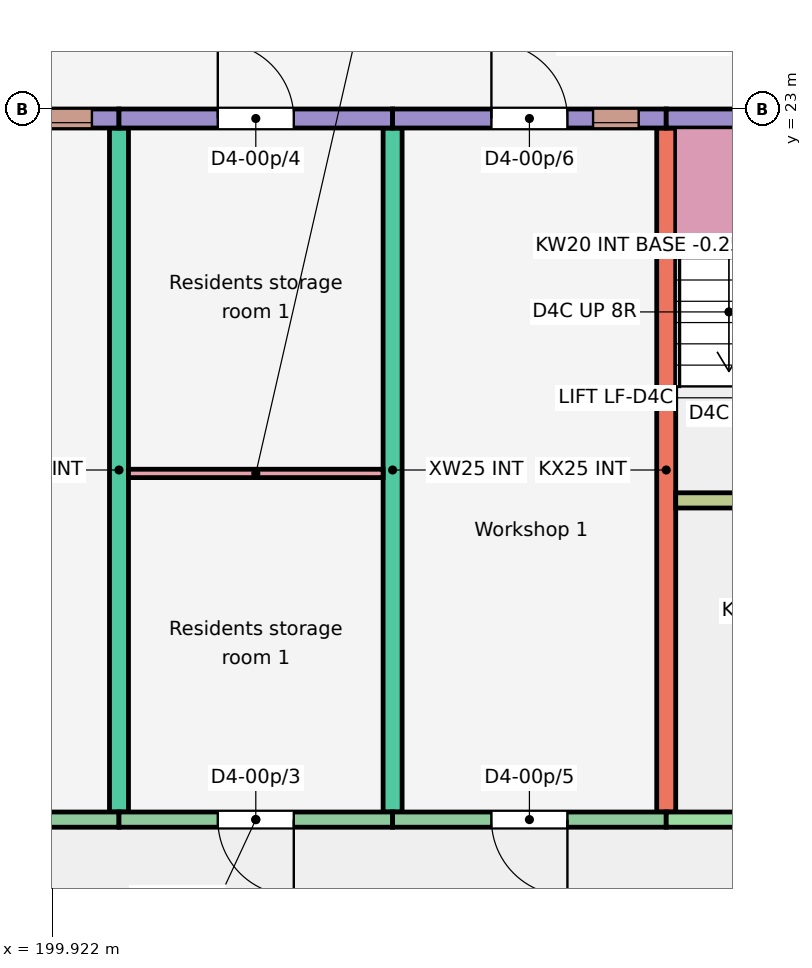
"""IFC4 building model, lengths in metres.
Left out: names, types, materials, properties, quantities, classifications, styles, units other than length and angle.
Written with IfcOpenShell. Run it as: python <this file> out.ifc"""

import sys

from ifc_helpers import new_model, si_unit, direction, frame, frame_2d, origin, place, context, subcontext, project, spatial, rectangle, extrude, element, fill, save


model = new_model("IFC4")
c1 = context("Model", 3, precision=1e-05, world=origin(), true_north=direction((0.0, 1.0)))
c2 = subcontext(c1, "Body", "Model", "MODEL_VIEW")
j1 = project(units=[si_unit("LENGTHUNIT", "METRE"), si_unit("PLANEANGLEUNIT", "RADIAN")], contexts=[c1])
p1 = place(None, origin())
s1 = spatial("IfcSite", under=j1, at=p1, CompositionType="ELEMENT")
p2 = place(p1, origin())
s2 = spatial("IfcBuilding", under=s1, at=p2, CompositionType="ELEMENT")
p3 = place(p2, origin())
s3 = spatial("IfcBuildingStorey", under=s2, at=p3, CompositionType="ELEMENT", Elevation=0.0)
for number, where, z_axis, x_axis in (
    (1, (200.8, 13.75, -0.25), (0.0, 0.0, 1.0), (0.0, 1.0, 0.0)),
    (2, (204.4, 13.75, -0.25), (0.0, 0.0, 1.0), (0.0, 1.0, 0.0)),
    (3, (208.0, 13.75, -0.25), (0.0, 0.0, 1.0), (0.0, 1.0, 0.0)),
):
    element("IfcWall", number, at=place(p3, frame(where, z_axis=z_axis, x_axis=x_axis)), inside=s3, PredefinedType="SHEAR", context=c2, shape_type="SweptSolid", body=[
        extrude(rectangle(XDim=9.0, YDim=0.25, at=frame_2d((4.5, 0.0))), origin(), (0.0, 0.0, 1.0), 3.25),
    ])
p4 = place(p3, frame((197.2, 22.875, -0.25), z_axis=(0.0, 0.0, 1.0), x_axis=(1.0, 0.0, 0.0)))
e4 = element("IfcWall", 4, at=p4, inside=s3, PredefinedType="SOLIDWALL", context=c2, shape_type="SweptSolid", body=[
    extrude(rectangle(XDim=3.6, YDim=0.25, at=frame_2d((1.8, 0.0))), origin(), (0.0, 0.0, 1.0), 3.25),
])
p5 = place(p4, frame((2.644, 0.0, 2.05)))
e5 = element("IfcOpeningElement", 5, at=p5, cuts=e4, PredefinedType="OPENING", context=c2, shape_type="SweptSolid", body=[
    extrude(rectangle(XDim=0.6, YDim=0.6, at=frame_2d((0.3, 0.3))), frame((0.0, 0.135, 0.0), z_axis=(0.0, -1.0, 0.0), x_axis=(1.0, 0.0, 0.0)), (0.0, 0.0, 1.0), 0.27),
])
p6 = place(p4, frame((1.312, 0.0, 0.25)))
e6 = element("IfcOpeningElement", 6, at=p6, cuts=e4, PredefinedType="OPENING", context=c2, shape_type="SweptSolid", body=[
    extrude(rectangle(XDim=1.0, YDim=2.1, at=frame_2d((0.5, 1.05))), frame((0.0, 0.135, 0.0), z_axis=(0.0, -1.0, 0.0), x_axis=(1.0, 0.0, 0.0)), (0.0, 0.0, 1.0), 0.27),
])
p7 = place(p3, frame((197.35, 13.65, -0.25), z_axis=(0.0, 0.0, 1.0), x_axis=(1.0, 0.0, 0.0)))
e7 = element("IfcWall", 7, at=p7, inside=s3, PredefinedType="SOLIDWALL", context=c2, shape_type="SweptSolid", body=[
    extrude(rectangle(XDim=3.45, YDim=0.2, at=frame_2d((1.725, 0.0))), origin(), (0.0, 0.0, 1.0), 3.25),
])
p8 = place(p7, frame((1.163, 0.0, 0.25)))
e8 = element("IfcOpeningElement", 8, at=p8, cuts=e7, PredefinedType="OPENING", context=c2, shape_type="SweptSolid", body=[
    extrude(rectangle(XDim=1.0, YDim=2.1, at=frame_2d((0.5, 1.05))), frame((0.0, 0.11, 0.0), z_axis=(0.0, -1.0, 0.0), x_axis=(1.0, 0.0, 0.0)), (0.0, 0.0, 1.0), 0.22),
])
p9 = place(p3, frame((200.8, 22.875, -0.25), z_axis=(0.0, 0.0, 1.0), x_axis=(1.0, 0.0, 0.0)))
e9 = element("IfcWall", 9, at=p9, inside=s3, PredefinedType="SOLIDWALL", context=c2, shape_type="SweptSolid", body=[
    extrude(rectangle(XDim=3.6, YDim=0.25, at=frame_2d((1.8, 0.0))), origin(), (0.0, 0.0, 1.0), 3.25),
])
p10 = place(p9, frame((1.3, 0.0, 0.25)))
e10 = element("IfcOpeningElement", 10, at=p10, cuts=e9, PredefinedType="OPENING", context=c2, shape_type="SweptSolid", body=[
    extrude(rectangle(XDim=1.0, YDim=2.1, at=frame_2d((0.5, 1.05))), frame((0.0, 0.135, 0.0), z_axis=(0.0, -1.0, 0.0), x_axis=(1.0, 0.0, 0.0)), (0.0, 0.0, 1.0), 0.27),
])
p11 = place(p3, frame((200.8, 13.65, -0.25), z_axis=(0.0, 0.0, 1.0), x_axis=(1.0, 0.0, 0.0)))
e11 = element("IfcWall", 11, at=p11, inside=s3, PredefinedType="SOLIDWALL", context=c2, shape_type="SweptSolid", body=[
    extrude(rectangle(XDim=3.6, YDim=0.2, at=frame_2d((1.8, 0.0))), origin(), (0.0, 0.0, 1.0), 3.25),
])
p12 = place(p11, frame((1.3, 0.0, 0.25)))
e12 = element("IfcOpeningElement", 12, at=p12, cuts=e11, PredefinedType="OPENING", context=c2, shape_type="SweptSolid", body=[
    extrude(rectangle(XDim=1.0, YDim=2.1, at=frame_2d((0.5, 1.05))), frame((0.0, 0.11, 0.0), z_axis=(0.0, -1.0, 0.0), x_axis=(1.0, 0.0, 0.0)), (0.0, 0.0, 1.0), 0.22),
])
p13 = place(p3, frame((204.4, 22.875, -0.25), z_axis=(0.0, 0.0, 1.0), x_axis=(1.0, 0.0, 0.0)))
e13 = element("IfcWall", 13, at=p13, inside=s3, PredefinedType="SOLIDWALL", context=c2, shape_type="SweptSolid", body=[
    extrude(rectangle(XDim=3.6, YDim=0.25, at=frame_2d((1.8, 0.0))), origin(), (0.0, 0.0, 1.0), 3.25),
])
p14 = place(p13, frame((2.637, 0.0, 2.05)))
e14 = element("IfcOpeningElement", 14, at=p14, cuts=e13, PredefinedType="OPENING", context=c2, shape_type="SweptSolid", body=[
    extrude(rectangle(XDim=0.6, YDim=0.6, at=frame_2d((0.3, 0.3))), frame((0.0, 0.135, 0.0), z_axis=(0.0, -1.0, 0.0), x_axis=(1.0, 0.0, 0.0)), (0.0, 0.0, 1.0), 0.27),
])
p15 = place(p13, frame((1.3, 0.0, 0.25)))
e15 = element("IfcOpeningElement", 15, at=p15, cuts=e13, PredefinedType="OPENING", context=c2, shape_type="SweptSolid", body=[
    extrude(rectangle(XDim=1.0, YDim=2.1, at=frame_2d((0.5, 1.05))), frame((0.0, 0.135, 0.0), z_axis=(0.0, -1.0, 0.0), x_axis=(1.0, 0.0, 0.0)), (0.0, 0.0, 1.0), 0.27),
])
p16 = place(p3, frame((204.4, 13.65, -0.25), z_axis=(0.0, 0.0, 1.0), x_axis=(1.0, 0.0, 0.0)))
e16 = element("IfcWall", 16, at=p16, inside=s3, PredefinedType="SOLIDWALL", context=c2, shape_type="SweptSolid", body=[
    extrude(rectangle(XDim=3.6, YDim=0.2, at=frame_2d((1.8, 0.0))), origin(), (0.0, 0.0, 1.0), 3.25),
])
p17 = place(p16, frame((1.3, 0.0, 0.25)))
e17 = element("IfcOpeningElement", 17, at=p17, cuts=e16, PredefinedType="OPENING", context=c2, shape_type="SweptSolid", body=[
    extrude(rectangle(XDim=1.0, YDim=2.1, at=frame_2d((0.5, 1.05))), frame((0.0, 0.11, 0.0), z_axis=(0.0, -1.0, 0.0), x_axis=(1.0, 0.0, 0.0)), (0.0, 0.0, 1.0), 0.22),
])
p18 = place(p3, frame((208.0, 22.875, -0.25), z_axis=(0.0, 0.0, 1.0), x_axis=(1.0, 0.0, 0.0)))
e18 = element("IfcWall", 18, at=p18, inside=s3, PredefinedType="SOLIDWALL", context=c2, shape_type="SweptSolid", body=[
    extrude(rectangle(XDim=6.0, YDim=0.25, at=frame_2d((3.0, 0.0))), origin(), (0.0, 0.0, 1.0), 3.25),
])
p19 = place(p18, frame((1.025, 0.0, 0.25)))
e19 = element("IfcOpeningElement", 19, at=p19, cuts=e18, PredefinedType="OPENING", context=c2, shape_type="SweptSolid", body=[
    extrude(rectangle(XDim=1.1, YDim=2.1, at=frame_2d((0.55, 1.05))), frame((0.0, 0.135, 0.0), z_axis=(0.0, -1.0, 0.0), x_axis=(1.0, 0.0, 0.0)), (0.0, 0.0, 1.0), 0.27),
])
p20 = place(p3, frame((208.0, 13.65, -0.25), z_axis=(0.0, 0.0, 1.0), x_axis=(1.0, 0.0, 0.0)))
e20 = element("IfcWall", 20, at=p20, inside=s3, PredefinedType="SHEAR", context=c2, shape_type="SweptSolid", body=[
    extrude(rectangle(XDim=5.85, YDim=0.2, at=frame_2d((2.925, 0.0))), origin(), (0.0, 0.0, 1.0), 3.25),
])
p21 = place(p20, frame((2.438, 0.0, 0.25)))
e21 = element("IfcOpeningElement", 21, at=p21, cuts=e20, PredefinedType="OPENING", context=c2, shape_type="SweptSolid", body=[
    extrude(rectangle(XDim=1.1, YDim=2.1, at=frame_2d((0.55, 1.05))), frame((0.0, 0.11, 0.0), z_axis=(0.0, -1.0, 0.0), x_axis=(1.0, 0.0, 0.0)), (0.0, 0.0, 1.0), 0.22),
])
p22 = place(p3, frame((208.125, 17.85, -0.25), z_axis=(0.0, 0.0, 1.0), x_axis=(1.0, 0.0, 0.0)))
e22 = element("IfcWall", 22, at=p22, inside=s3, PredefinedType="SHEAR", context=c2, shape_type="SweptSolid", body=[
    extrude(rectangle(XDim=5.725, YDim=0.2, at=frame_2d((2.863, 0.0))), origin(), (0.0, 0.0, 1.0), 3.25),
])
p23 = place(p22, frame((0.95, 0.0, 0.25)))
e23 = element("IfcOpeningElement", 23, at=p23, cuts=e22, PredefinedType="OPENING", context=c2, shape_type="SweptSolid", body=[
    extrude(rectangle(XDim=1.0, YDim=2.1, at=frame_2d((0.5, 1.05))), frame((0.0, 0.11, 0.0), z_axis=(0.0, -1.0, 0.0), x_axis=(1.0, 0.0, 0.0)), (0.0, 0.0, 1.0), 0.22),
])
p24 = place(p22, frame((3.863, 0.0, 0.25)))
e24 = element("IfcOpeningElement", 24, at=p24, cuts=e22, PredefinedType="OPENING", context=c2, shape_type="SweptSolid", body=[
    extrude(rectangle(XDim=1.1, YDim=2.1, at=frame_2d((0.55, 1.05))), frame((0.0, 0.11, 0.0), z_axis=(0.0, -1.0, 0.0), x_axis=(1.0, 0.0, 0.0)), (0.0, 0.0, 1.0), 0.22),
])
p25 = place(p3, frame((200.925, 18.205, 0.0), z_axis=(0.0, 0.0, 1.0), x_axis=(1.0, 0.0, 0.0)))
e25 = element("IfcWall", 25, at=p25, inside=s3, PredefinedType="PARTITIONING", context=c2, shape_type="SweptSolid", body=[
    extrude(rectangle(XDim=3.35, YDim=0.11, at=frame_2d((1.675, 0.0))), origin(), (0.0, 0.0, 1.0), 2.8),
])
p26 = place(p5, origin())
e26 = element("IfcWindow", 26, at=p26, inside=s3, PartitioningType="SINGLE_PANEL", PredefinedType="WINDOW", context=c2, shape_type="SweptSolid", body=[
    extrude(rectangle(XDim=0.6, YDim=0.6, at=frame_2d((0.3, 0.3))), frame((0.0, -0.025, 0.0), z_axis=(0.0, -1.0, 0.0), x_axis=(1.0, 0.0, 0.0)), (0.0, 0.0, 1.0), 0.06),
])
fill(e5, e26)
p27 = place(p14, origin())
e27 = element("IfcWindow", 27, at=p27, inside=s3, PartitioningType="SINGLE_PANEL", PredefinedType="WINDOW", context=c2, shape_type="SweptSolid", body=[
    extrude(rectangle(XDim=0.6, YDim=0.6, at=frame_2d((0.3, 0.3))), frame((0.0, -0.025, 0.0), z_axis=(0.0, -1.0, 0.0), x_axis=(1.0, 0.0, 0.0)), (0.0, 0.0, 1.0), 0.06),
])
fill(e14, e27)
p28 = place(p12, origin())
e28 = element("IfcDoor", 28, at=p28, inside=s3, OperationType="SINGLE_SWING_RIGHT", PredefinedType="DOOR", context=c2, shape_type="SweptSolid", body=[
    extrude(rectangle(XDim=1.0, YDim=2.1, at=frame_2d((0.5, 1.05))), frame((0.0, 0.025, 0.0), z_axis=(0.0, -1.0, 0.0), x_axis=(1.0, 0.0, 0.0)), (0.0, 0.0, 1.0), 0.05),
])
fill(e12, e28)
p29 = place(p10, origin())
e29 = element("IfcDoor", 29, at=p29, inside=s3, OperationType="SINGLE_SWING_LEFT", PredefinedType="DOOR", context=c2, shape_type="SweptSolid", body=[
    extrude(rectangle(XDim=1.0, YDim=2.1, at=frame_2d((0.5, 1.05))), frame((0.0, 0.025, 0.0), z_axis=(0.0, -1.0, 0.0), x_axis=(1.0, 0.0, 0.0)), (0.0, 0.0, 1.0), 0.05),
])
fill(e10, e29)
p30 = place(p17, origin())
e30 = element("IfcDoor", 30, at=p30, inside=s3, OperationType="SINGLE_SWING_RIGHT", PredefinedType="DOOR", context=c2, shape_type="SweptSolid", body=[
    extrude(rectangle(XDim=1.0, YDim=2.1, at=frame_2d((0.5, 1.05))), frame((0.0, 0.025, 0.0), z_axis=(0.0, -1.0, 0.0), x_axis=(1.0, 0.0, 0.0)), (0.0, 0.0, 1.0), 0.05),
])
fill(e17, e30)
p31 = place(p15, origin())
e31 = element("IfcDoor", 31, at=p31, inside=s3, OperationType="SINGLE_SWING_LEFT", PredefinedType="DOOR", context=c2, shape_type="SweptSolid", body=[
    extrude(rectangle(XDim=1.0, YDim=2.1, at=frame_2d((0.5, 1.05))), frame((0.0, 0.025, 0.0), z_axis=(0.0, -1.0, 0.0), x_axis=(1.0, 0.0, 0.0)), (0.0, 0.0, 1.0), 0.05),
])
fill(e15, e31)
save(model, sys.argv[1])
